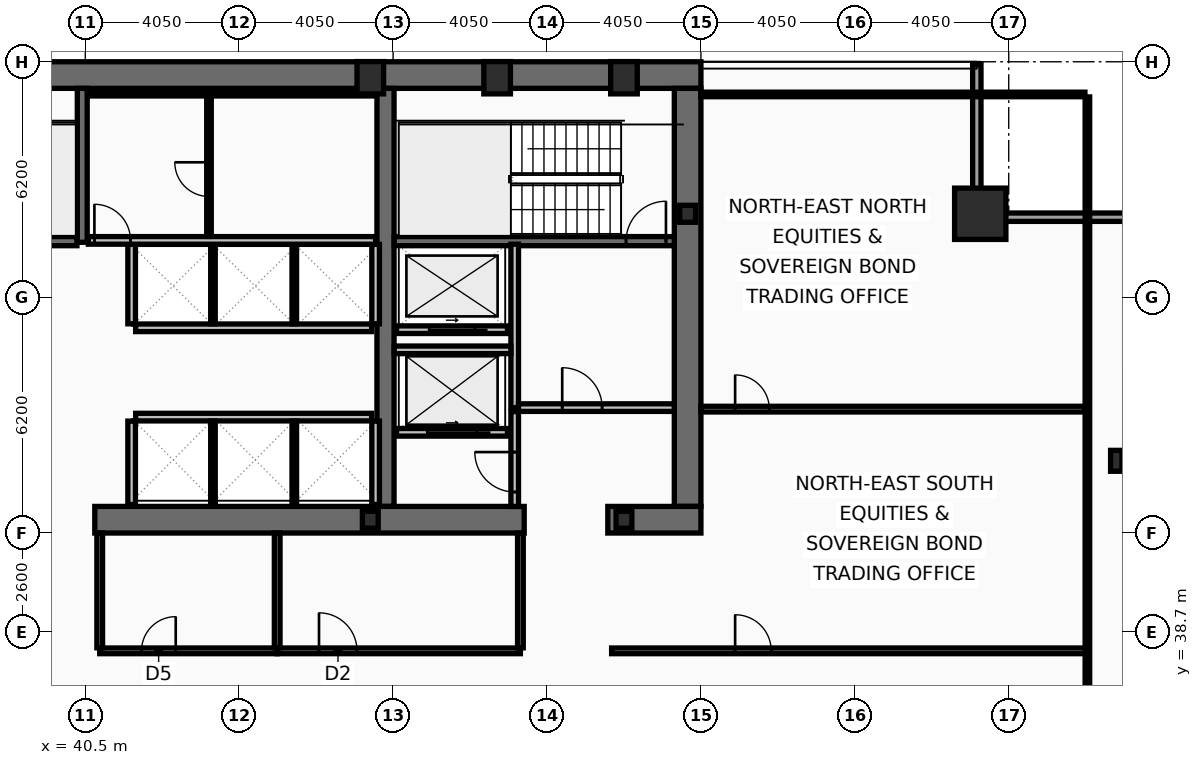
"""IFC4 building model, lengths in metres.
Left out: names, types, materials, properties, quantities, classifications, styles, units other than length and angle.
Written with IfcOpenShell. Run it as: python <this file> out.ifc"""

import sys

from ifc_helpers import new_model, si_unit, direction, frame, frame_2d, origin, origin_2d, place, context, subcontext, project, spatial, rectangle, hollow_rectangle, i_section, extrude, element, fill, save


model = new_model("IFC4")
c1 = context("Model", 3, precision=1e-05, world=origin(), true_north=direction((0.0, 1.0)))
c2 = subcontext(c1, "Body", "Model", "MODEL_VIEW")
j1 = project(units=[si_unit("LENGTHUNIT", "METRE"), si_unit("PLANEANGLEUNIT", "RADIAN")], contexts=[c1])
p1 = place(None, origin())
s1 = spatial("IfcSite", under=j1, at=p1, CompositionType="ELEMENT")
p2 = place(p1, origin())
s2 = spatial("IfcBuilding", under=s1, at=p2, CompositionType="ELEMENT")
p3 = place(p2, frame((0.0, 0.0, 154.2)))
s3 = spatial("IfcBuildingStorey", under=s2, at=p3, CompositionType="ELEMENT", Elevation=154.2)
p4 = place(p3, frame((16.2, 53.35, 0.0), z_axis=(0.0, 0.0, 1.0), x_axis=(1.0, 0.0, 0.0)))
e1 = element("IfcWall", 1, at=p4, inside=s3, PredefinedType="SHEAR", context=c2, shape_type="SweptSolid", body=[
    extrude(rectangle(XDim=40.5, YDim=0.7, at=frame_2d((20.25, 0.0))), origin(), (0.0, 0.0, 1.0), 3.44),
])
p5 = place(p3, frame((56.35, 53.0, 0.0), z_axis=(0.0, 0.0, 1.0), x_axis=(0.0, -1.0, 0.0)))
e2 = element("IfcWall", 2, at=p5, inside=s3, PredefinedType="SHEAR", context=c2, shape_type="SweptSolid", body=[
    extrude(rectangle(XDim=11.0, YDim=0.7, at=frame_2d((5.5, 0.0))), origin(), (0.0, 0.0, 1.0), 3.44),
])
p6 = place(p3, frame((48.4, 42.0, 0.0), z_axis=(0.0, 0.0, 1.0), x_axis=(0.0, 1.0, 0.0)))
e3 = element("IfcWall", 3, at=p6, inside=s3, PredefinedType="SHEAR", context=c2, shape_type="SweptSolid", body=[
    extrude(rectangle(XDim=11.0, YDim=0.45, at=frame_2d((5.5, 0.0))), origin(), (0.0, 0.0, 1.0), 3.44),
])
p7 = place(p3, frame((52.05, 41.65, 0.0), z_axis=(0.0, 0.0, 1.0), x_axis=(-1.0, 0.0, 0.0)))
e4 = element("IfcWall", 4, at=p7, inside=s3, PredefinedType="SHEAR", context=c2, shape_type="SweptSolid", body=[
    extrude(rectangle(XDim=11.3, YDim=0.7, at=frame_2d((5.65, 0.0))), origin(), (0.0, 0.0, 1.0), 3.44),
])
p8 = place(p3, frame((56.7, 41.65, 0.0), z_axis=(0.0, 0.0, 1.0), x_axis=(-1.0, 0.0, 0.0)))
e5 = element("IfcWall", 5, at=p8, inside=s3, PredefinedType="SHEAR", context=c2, shape_type="SweptSolid", body=[
    extrude(rectangle(XDim=2.45, YDim=0.7, at=frame_2d((1.225, 0.0))), origin(), (0.0, 0.0, 1.0), 3.44),
])
p9 = place(p3, frame((40.42, 48.95, 0.0), z_axis=(0.0, 0.0, 1.0), x_axis=(0.0, 1.0, 0.0)))
e6 = element("IfcWall", 6, at=p9, inside=s3, PredefinedType="SHEAR", context=c2, shape_type="SweptSolid", body=[
    extrude(rectangle(XDim=4.05, YDim=0.26, at=frame_2d((2.025, 0.0))), origin(), (0.0, 0.0, 1.0), 3.44),
])
p10 = place(p3, frame((48.63, 48.98, 0.0), z_axis=(0.0, 0.0, 1.0), x_axis=(1.0, 0.0, 0.0)))
e7 = element("IfcWall", 7, at=p10, inside=s3, PredefinedType="SHEAR", context=c2, shape_type="SweptSolid", body=[
    extrude(rectangle(XDim=7.37, YDim=0.24, at=frame_2d((3.685, 0.0))), origin(), (0.0, 0.0, 1.0), 3.44),
])
p11 = place(p10, frame((6.1, 0.0, 0.0)))
e8 = element("IfcOpeningElement", 8, at=p11, cuts=e7, PredefinedType="OPENING", context=c2, shape_type="SweptSolid", body=[
    extrude(rectangle(XDim=1.05, YDim=2.15, at=frame_2d((0.525, 1.075))), frame((0.0, 0.13, 0.0), z_axis=(0.0, -1.0, 0.0), x_axis=(1.0, 0.0, 0.0)), (0.0, 0.0, 1.0), 0.26),
])
p12 = place(p3, frame((32.72, 48.98, 0.0), z_axis=(0.0, 0.0, 1.0), x_axis=(1.0, 0.0, 0.0)))
e9 = element("IfcWall", 9, at=p12, inside=s3, PredefinedType="SHEAR", context=c2, shape_type="SweptSolid", body=[
    extrude(rectangle(XDim=7.56, YDim=0.24, at=frame_2d((3.78, 0.0))), origin(), (0.0, 0.0, 1.0), 3.44),
])
p13 = place(p12, frame((0.22, 0.0, 0.0)))
e10 = element("IfcOpeningElement", 10, at=p13, cuts=e9, PredefinedType="OPENING", context=c2, shape_type="SweptSolid", body=[
    extrude(rectangle(XDim=1.05, YDim=2.15, at=frame_2d((0.525, 1.075))), frame((0.0, 0.13, 0.0), z_axis=(0.0, -1.0, 0.0), x_axis=(1.0, 0.0, 0.0)), (0.0, 0.0, 1.0), 0.26),
])
p14 = place(p3, frame((64.05, 49.7, 0.0), z_axis=(0.0, 0.0, 1.0), x_axis=(1.0, 0.0, 0.0)))
e11 = element("IfcColumn", 11, at=p14, inside=s3, PredefinedType="COLUMN", context=c2, shape_type="SweptSolid", body=[
    extrude(hollow_rectangle(XDim=1.35, YDim=1.35, WallThickness=0.065, at=origin_2d()), origin(), (0.0, 0.0, 1.0), 3.6),
])
for number, where, z_axis, x_axis in (
    (12, (48.0, 53.28, 0.0), (0.0, 0.0, 1.0), (1.0, 0.0, 0.0)),
    (13, (51.337, 53.28, 0.0), (0.0, 0.0, 1.0), (1.0, 0.0, 0.0)),
    (14, (54.675, 53.28, 0.0), (0.0, 0.0, 1.0), (1.0, 0.0, 0.0)),
):
    element("IfcColumn", number, at=place(p3, frame(where, z_axis=z_axis, x_axis=x_axis)), inside=s3, PredefinedType="COLUMN", context=c2, shape_type="SweptSolid", body=[
        extrude(hollow_rectangle(XDim=0.7, YDim=0.85, WallThickness=0.05, at=origin_2d()), origin(), (0.0, 0.0, 1.0), 3.6),
    ])
p15 = place(p3, frame((67.63, 43.2, 0.0), z_axis=(0.0, 0.0, 1.0), x_axis=(1.0, 0.0, 0.0)))
e15 = element("IfcColumn", 15, at=p15, inside=s3, PredefinedType="COLUMN", context=c2, shape_type="SweptSolid", body=[
    extrude(i_section(OverallWidth=0.3, OverallDepth=0.55, WebThickness=0.015, FlangeThickness=0.029, at=origin_2d()), origin(), (0.0, 0.0, 1.0), 3.6),
])
for number, where, z_axis, x_axis in (
    (16, (56.35, 49.7, 0.0), (0.0, 0.0, 1.0), (1.0, 0.0, 0.0)),
    (17, (48.0, 41.65, 0.0), (0.0, 0.0, 1.0), (1.0, 0.0, 0.0)),
    (18, (54.675, 41.65, 0.0), (0.0, 0.0, 1.0), (1.0, 0.0, 0.0)),
):
    element("IfcColumn", number, at=place(p3, frame(where, z_axis=z_axis, x_axis=x_axis)), inside=s3, PredefinedType="COLUMN", context=c2, shape_type="SweptSolid", body=[
        extrude(i_section(OverallWidth=0.416, OverallDepth=0.446, WebThickness=0.039, FlangeThickness=0.063, at=origin_2d()), origin(), (0.0, 0.0, 1.0), 3.6),
    ])
p16 = place(p3, frame((63.96, 53.63, 0.0), z_axis=(0.0, 0.0, 1.0), x_axis=(0.0, -1.0, 0.0)))
e19 = element("IfcWall", 19, at=p16, inside=s3, PredefinedType="SOLIDWALL", context=c2, shape_type="SweptSolid", body=[
    extrude(rectangle(XDim=3.91, YDim=0.22, at=frame_2d((1.955, 0.0))), origin(), (0.0, 0.0, 1.0), 2.83),
])
p17 = place(p3, frame((63.85, 49.61, 0.0), z_axis=(0.0, 0.0, 1.0), x_axis=(1.0, 0.0, 0.0)))
e20 = element("IfcWall", 20, at=p17, inside=s3, PredefinedType="SOLIDWALL", context=c2, shape_type="SweptSolid", body=[
    extrude(rectangle(XDim=4.22, YDim=0.22, at=frame_2d((2.11, 0.0))), origin(), (0.0, 0.0, 1.0), 2.83),
])
p18 = place(p3, frame((51.61, 43.95, 0.0), z_axis=(0.0, 0.0, 1.0), x_axis=(-1.0, 0.0, 0.0)))
e21 = element("IfcWall", 21, at=p18, inside=s3, PredefinedType="PARTITIONING", context=c2, shape_type="SweptSolid", body=[
    extrude(rectangle(XDim=2.92, YDim=0.2, at=frame_2d((1.46, 0.0))), origin(), (0.0, 0.0, 1.0), 3.44),
])
p19 = place(p18, frame((0.81, 0.0, 0.0)))
e22 = element("IfcOpeningElement", 22, at=p19, cuts=e21, PredefinedType="OPENING", context=c2, shape_type="SweptSolid", body=[
    extrude(rectangle(XDim=1.3, YDim=2.18, at=frame_2d((0.65, 1.09))), frame((0.0, 0.11, 0.0), z_axis=(0.0, -1.0, 0.0), x_axis=(1.0, 0.0, 0.0)), (0.0, 0.0, 1.0), 0.22),
])
p20 = place(p3, frame((51.61, 46.65, 0.0), z_axis=(0.0, 0.0, 1.0), x_axis=(-1.0, 0.0, 0.0)))
e23 = element("IfcWall", 23, at=p20, inside=s3, PredefinedType="PARTITIONING", context=c2, shape_type="SweptSolid", body=[
    extrude(rectangle(XDim=2.92, YDim=0.2, at=frame_2d((1.46, 0.0))), origin(), (0.0, 0.0, 1.0), 3.44),
])
p21 = place(p20, frame((0.86, 0.0, 0.0)))
e24 = element("IfcOpeningElement", 24, at=p21, cuts=e23, PredefinedType="OPENING", context=c2, shape_type="SweptSolid", body=[
    extrude(rectangle(XDim=1.2, YDim=2.18, at=frame_2d((0.6, 1.09))), frame((0.0, 0.11, 0.0), z_axis=(0.0, -1.0, 0.0), x_axis=(1.0, 0.0, 0.0)), (0.0, 0.0, 1.0), 0.22),
])
p22 = place(p3, frame((51.8, 44.6, 0.0), z_axis=(0.0, 0.0, 1.0), x_axis=(0.0, 1.0, 0.0)))
e25 = element("IfcWall", 25, at=p22, inside=s3, PredefinedType="PARTITIONING", context=c2, shape_type="SweptSolid", body=[
    extrude(rectangle(XDim=4.3, YDim=0.2, at=frame_2d((2.15, 0.0))), origin(), (0.0, 0.0, 1.0), 3.44),
])
p23 = place(p3, frame((51.9, 44.6, 0.0), z_axis=(0.0, 0.0, 1.0), x_axis=(1.0, 0.0, 0.0)))
e26 = element("IfcWall", 26, at=p23, inside=s3, PredefinedType="PARTITIONING", context=c2, shape_type="SweptSolid", body=[
    extrude(rectangle(XDim=4.1, YDim=0.2, at=frame_2d((2.05, 0.0))), origin(), (0.0, 0.0, 1.0), 3.44),
])
p24 = place(p23, frame((1.15, 0.0, 0.0)))
e27 = element("IfcOpeningElement", 27, at=p24, cuts=e26, PredefinedType="OPENING", context=c2, shape_type="SweptSolid", body=[
    extrude(rectangle(XDim=1.05, YDim=2.15, at=frame_2d((0.525, 1.075))), frame((0.0, 0.11, 0.0), z_axis=(0.0, -1.0, 0.0), x_axis=(1.0, 0.0, 0.0)), (0.0, 0.0, 1.0), 0.22),
])
p25 = place(p3, frame((48.63, 46.12, 0.0), z_axis=(0.0, 0.0, 1.0), x_axis=(1.0, 0.0, 0.0)))
e28 = element("IfcWall", 28, at=p25, inside=s3, PredefinedType="PARTITIONING", context=c2, shape_type="SweptSolid", body=[
    extrude(rectangle(XDim=3.07, YDim=0.2, at=frame_2d((1.535, 0.0))), origin(), (0.0, 0.0, 1.0), 3.44),
])
p26 = place(p3, frame((51.8, 42.0, 0.0), z_axis=(0.0, 0.0, 1.0), x_axis=(0.0, 1.0, 0.0)))
e29 = element("IfcWall", 29, at=p26, inside=s3, PredefinedType="PARTITIONING", context=c2, shape_type="SweptSolid", body=[
    extrude(rectangle(XDim=2.495, YDim=0.2, at=frame_2d((1.248, 0.0))), origin(), (0.0, 0.0, 1.0), 3.44),
])
p27 = place(p26, frame((0.38, 0.0, 0.0)))
e30 = element("IfcOpeningElement", 30, at=p27, cuts=e29, PredefinedType="OPENING", context=c2, shape_type="SweptSolid", body=[
    extrude(rectangle(XDim=1.05, YDim=2.15, at=frame_2d((0.525, 1.075))), frame((0.0, 0.11, 0.0), z_axis=(0.0, -1.0, 0.0), x_axis=(1.0, 0.0, 0.0)), (0.0, 0.0, 1.0), 0.22),
])
p28 = place(p3, frame((41.825, 46.7, 0.0), z_axis=(0.0, 0.0, 1.0), x_axis=(1.0, 0.0, 0.0)))
e31 = element("IfcWall", 31, at=p28, inside=s3, PredefinedType="PARTITIONING", context=c2, shape_type="SweptSolid", body=[
    extrude(rectangle(XDim=6.21, YDim=0.2, at=frame_2d((3.105, 0.0))), origin(), (0.0, 0.0, 1.0), 3.44),
])
for number, where, z_axis, x_axis in (
    (32, (41.72, 46.805, 0.0), (0.0, 0.0, 1.0), (0.0, 1.0, 0.0)),
    (33, (48.14, 46.805, 0.0), (0.0, 0.0, 1.0), (0.0, 1.0, 0.0)),
):
    element("IfcWall", number, at=place(p3, frame(where, z_axis=z_axis, x_axis=x_axis)), inside=s3, PredefinedType="PARTITIONING", context=c2, shape_type="SweptSolid", body=[
        extrude(rectangle(XDim=2.09, YDim=0.2, at=frame_2d((1.045, 0.0))), origin(), (0.0, 0.0, 1.0), 3.44),
    ])
for number, where, z_axis, x_axis in (
    (34, (43.86, 46.805, 0.0), (0.0, 0.0, 1.0), (0.0, 1.0, 0.0)),
    (35, (46.0, 46.805, 0.0), (0.0, 0.0, 1.0), (0.0, 1.0, 0.0)),
):
    element("IfcWall", number, at=place(p3, frame(where, z_axis=z_axis, x_axis=x_axis)), inside=s3, PredefinedType="PARTITIONING", context=c2, shape_type="SweptSolid", body=[
        extrude(rectangle(XDim=2.09, YDim=0.12, at=frame_2d((1.045, 0.0))), origin(), (0.0, 0.0, 1.0), 3.44),
    ])
p29 = place(p3, frame((41.825, 44.35, 0.0), z_axis=(0.0, 0.0, 1.0), x_axis=(1.0, 0.0, 0.0)))
e36 = element("IfcWall", 36, at=p29, inside=s3, PredefinedType="PARTITIONING", context=c2, shape_type="SweptSolid", body=[
    extrude(rectangle(XDim=6.21, YDim=0.2, at=frame_2d((3.105, 0.0))), origin(), (0.0, 0.0, 1.0), 3.44),
])
for number, where, z_axis, x_axis in (
    (37, (41.72, 42.05, 0.0), (0.0, 0.0, 1.0), (0.0, 1.0, 0.0)),
    (38, (48.14, 42.05, 0.0), (0.0, 0.0, 1.0), (0.0, 1.0, 0.0)),
):
    element("IfcWall", number, at=place(p3, frame(where, z_axis=z_axis, x_axis=x_axis)), inside=s3, PredefinedType="PARTITIONING", context=c2, shape_type="SweptSolid", body=[
        extrude(rectangle(XDim=2.195, YDim=0.2, at=frame_2d((1.098, 0.0))), origin(), (0.0, 0.0, 1.0), 3.44),
    ])
for number, where, z_axis, x_axis in (
    (39, (43.86, 42.05, 0.0), (0.0, 0.0, 1.0), (0.0, 1.0, 0.0)),
    (40, (46.0, 42.05, 0.0), (0.0, 0.0, 1.0), (0.0, 1.0, 0.0)),
):
    element("IfcWall", number, at=place(p3, frame(where, z_axis=z_axis, x_axis=x_axis)), inside=s3, PredefinedType="PARTITIONING", context=c2, shape_type="SweptSolid", body=[
        extrude(rectangle(XDim=2.195, YDim=0.12, at=frame_2d((1.098, 0.0))), origin(), (0.0, 0.0, 1.0), 3.44),
    ])
p30 = place(p3, frame((40.58, 52.86, 0.0), z_axis=(0.0, 0.0, 1.0), x_axis=(1.0, 0.0, 0.0)))
e41 = element("IfcWall", 41, at=p30, inside=s3, PredefinedType="PARTITIONING", context=c2, shape_type="SweptSolid", body=[
    extrude(rectangle(XDim=7.56, YDim=0.12, at=frame_2d((3.78, 0.0))), origin(), (0.0, 0.0, 1.0), 3.44),
])
p31 = place(p3, frame((40.58, 49.0, 0.0), z_axis=(0.0, 0.0, 1.0), x_axis=(1.0, 0.0, 0.0)))
e42 = element("IfcWall", 42, at=p31, inside=s3, PredefinedType="PARTITIONING", context=c2, shape_type="SweptSolid", body=[
    extrude(rectangle(XDim=7.56, YDim=0.2, at=frame_2d((3.78, 0.0))), origin(), (0.0, 0.0, 1.0), 3.44),
])
p32 = place(p31, frame((0.16, 0.0, 0.0)))
e43 = element("IfcOpeningElement", 43, at=p32, cuts=e42, PredefinedType="OPENING", context=c2, shape_type="SweptSolid", body=[
    extrude(rectangle(XDim=0.95, YDim=2.1, at=frame_2d((0.475, 1.05))), frame((0.0, 0.11, 0.0), z_axis=(0.0, -1.0, 0.0), x_axis=(1.0, 0.0, 0.0)), (0.0, 0.0, 1.0), 0.22),
])
p33 = place(p3, frame((43.755, 49.105, 0.0), z_axis=(0.0, 0.0, 1.0), x_axis=(0.0, 1.0, 0.0)))
e44 = element("IfcWall", 44, at=p33, inside=s3, PredefinedType="PARTITIONING", context=c2, shape_type="SweptSolid", body=[
    extrude(rectangle(XDim=3.69, YDim=0.12, at=frame_2d((1.845, 0.0))), origin(), (0.0, 0.0, 1.0), 3.44),
])
p34 = place(p33, frame((1.05, 0.0, 0.0)))
e45 = element("IfcOpeningElement", 45, at=p34, cuts=e44, PredefinedType="OPENING", context=c2, shape_type="SweptSolid", body=[
    extrude(rectangle(XDim=0.9, YDim=2.05, at=frame_2d((0.45, 1.025))), frame((0.0, 0.07, 0.0), z_axis=(0.0, -1.0, 0.0), x_axis=(1.0, 0.0, 0.0)), (0.0, 0.0, 1.0), 0.14),
])
p35 = place(p3, frame((40.88, 38.2, 0.0), z_axis=(0.0, 0.0, 1.0), x_axis=(1.0, 0.0, 0.0)))
e46 = element("IfcWall", 46, at=p35, inside=s3, PredefinedType="PARTITIONING", context=c2, shape_type="SweptSolid", body=[
    extrude(rectangle(XDim=4.67, YDim=0.15, at=frame_2d((2.335, 0.0))), origin(), (0.0, 0.0, 1.0), 2.73),
])
p36 = place(p35, frame((1.1, 0.0, 0.0)))
e47 = element("IfcOpeningElement", 47, at=p36, cuts=e46, PredefinedType="OPENING", context=c2, shape_type="SweptSolid", body=[
    extrude(rectangle(XDim=0.9, YDim=2.05, at=frame_2d((0.45, 1.025))), frame((0.0, 0.085, 0.0), z_axis=(0.0, -1.0, 0.0), x_axis=(1.0, 0.0, 0.0)), (0.0, 0.0, 1.0), 0.17),
])
p37 = place(p3, frame((45.55, 38.2, 0.0), z_axis=(0.0, 0.0, 1.0), x_axis=(1.0, 0.0, 0.0)))
e48 = element("IfcWall", 48, at=p37, inside=s3, PredefinedType="PARTITIONING", context=c2, shape_type="SweptSolid", body=[
    extrude(rectangle(XDim=6.4, YDim=0.15, at=frame_2d((3.2, 0.0))), origin(), (0.0, 0.0, 1.0), 2.73),
])
p38 = place(p37, frame((1.1, 0.0, 0.0)))
e49 = element("IfcOpeningElement", 49, at=p38, cuts=e48, PredefinedType="OPENING", context=c2, shape_type="SweptSolid", body=[
    extrude(rectangle(XDim=1.0, YDim=2.05, at=frame_2d((0.5, 1.025))), frame((0.0, 0.085, 0.0), z_axis=(0.0, -1.0, 0.0), x_axis=(1.0, 0.0, 0.0)), (0.0, 0.0, 1.0), 0.17),
])
for number, where, z_axis, x_axis in (
    (50, (40.88, 38.28, 0.0), (0.0, 0.0, 1.0), (0.0, 1.0, 0.0)),
    (51, (45.55, 38.28, 0.0), (0.0, 0.0, 1.0), (0.0, 1.0, 0.0)),
    (52, (51.95, 38.28, 0.0), (0.0, 0.0, 1.0), (0.0, 1.0, 0.0)),
):
    element("IfcWall", number, at=place(p3, frame(where, z_axis=z_axis, x_axis=x_axis)), inside=s3, PredefinedType="PARTITIONING", context=c2, shape_type="SweptSolid", body=[
        extrude(rectangle(XDim=3.02, YDim=0.15, at=frame_2d((1.51, 0.0))), origin(), (0.0, 0.0, 1.0), 3.44),
    ])
p39 = place(p3, frame((54.35, 38.2, 0.0), z_axis=(0.0, 0.0, 1.0), x_axis=(1.0, 0.0, 0.0)))
e53 = element("IfcWall", 53, at=p39, inside=s3, PredefinedType="PARTITIONING", context=c2, shape_type="SweptSolid", body=[
    extrude(rectangle(XDim=12.52, YDim=0.15, at=frame_2d((6.26, 0.0))), origin(), (0.0, 0.0, 1.0), 2.73),
])
p40 = place(p39, frame((3.25, 0.0, 0.0)))
e54 = element("IfcOpeningElement", 54, at=p40, cuts=e53, PredefinedType="OPENING", context=c2, shape_type="SweptSolid", body=[
    extrude(rectangle(XDim=0.95, YDim=2.05, at=frame_2d((0.475, 1.025))), frame((0.0, 0.085, 0.0), z_axis=(0.0, -1.0, 0.0), x_axis=(1.0, 0.0, 0.0)), (0.0, 0.0, 1.0), 0.17),
])
p41 = place(p3, frame((56.7, 44.56, 0.0), z_axis=(0.0, 0.0, 1.0), x_axis=(1.0, 0.0, 0.0)))
e55 = element("IfcWall", 55, at=p41, inside=s3, PredefinedType="PARTITIONING", context=c2, shape_type="SweptSolid", body=[
    extrude(rectangle(XDim=10.105, YDim=0.15, at=frame_2d((5.052, 0.0))), origin(), (0.0, 0.0, 1.0), 2.83),
])
p42 = place(p41, frame((0.9, 0.0, 0.0)))
e56 = element("IfcOpeningElement", 56, at=p42, cuts=e55, PredefinedType="OPENING", context=c2, shape_type="SweptSolid", body=[
    extrude(rectangle(XDim=0.9, YDim=2.05, at=frame_2d((0.45, 1.025))), frame((0.0, 0.085, 0.0), z_axis=(0.0, -1.0, 0.0), x_axis=(1.0, 0.0, 0.0)), (0.0, 0.0, 1.0), 0.17),
])
p43 = place(p3, frame((66.87, 10.665, 0.0), z_axis=(0.0, 0.0, 1.0), x_axis=(0.0, 1.0, 0.0)))
e57 = element("IfcWall", 57, at=p43, inside=s3, PredefinedType="PARTITIONING", context=c2, shape_type="SweptSolid", body=[
    extrude(rectangle(XDim=42.11, YDim=0.12, at=frame_2d((21.055, 0.0))), origin(), (0.0, 0.0, 1.0), 2.73),
])
p44 = place(p3, frame((56.7, 52.84, 0.0), z_axis=(0.0, 0.0, 1.0), x_axis=(1.0, 0.0, 0.0)))
e58 = element("IfcWall", 58, at=p44, inside=s3, PredefinedType="PARTITIONING", context=c2, shape_type="SweptSolid", body=[
    extrude(rectangle(XDim=10.105, YDim=0.12, at=frame_2d((5.052, 0.0))), origin(), (0.0, 0.0, 1.0), 3.44),
])
p45 = place(p11, origin())
e59 = element("IfcDoor", 59, at=p45, inside=s3, OperationType="SINGLE_SWING_RIGHT", PredefinedType="DOOR", context=c2, shape_type="SweptSolid", body=[
    extrude(rectangle(XDim=1.05, YDim=2.15, at=frame_2d((0.525, 1.075))), frame((0.0, 0.025, 0.0), z_axis=(0.0, -1.0, 0.0), x_axis=(1.0, 0.0, 0.0)), (0.0, 0.0, 1.0), 0.05),
])
fill(e8, e59)
p46 = place(p19, origin())
e60 = element("IfcDoor", 60, at=p46, inside=s3, OperationType="SLIDING_TO_LEFT", PredefinedType="DOOR", context=c2, shape_type="SweptSolid", body=[
    extrude(rectangle(XDim=1.3, YDim=2.18, at=frame_2d((0.65, 1.09))), frame((0.0, 0.025, 0.0), z_axis=(0.0, -1.0, 0.0), x_axis=(1.0, 0.0, 0.0)), (0.0, 0.0, 1.0), 0.05),
])
fill(e22, e60)
p47 = place(p21, origin())
e61 = element("IfcDoor", 61, at=p47, inside=s3, OperationType="SLIDING_TO_LEFT", PredefinedType="DOOR", context=c2, shape_type="SweptSolid", body=[
    extrude(rectangle(XDim=1.2, YDim=2.18, at=frame_2d((0.6, 1.09))), frame((0.0, 0.025, 0.0), z_axis=(0.0, -1.0, 0.0), x_axis=(1.0, 0.0, 0.0)), (0.0, 0.0, 1.0), 0.05),
])
fill(e24, e61)
p48 = place(p24, origin())
e62 = element("IfcDoor", 62, at=p48, inside=s3, OperationType="SINGLE_SWING_LEFT", PredefinedType="DOOR", context=c2, shape_type="SweptSolid", body=[
    extrude(rectangle(XDim=1.05, YDim=2.15, at=frame_2d((0.525, 1.075))), frame((0.0, 0.025, 0.0), z_axis=(0.0, -1.0, 0.0), x_axis=(1.0, 0.0, 0.0)), (0.0, 0.0, 1.0), 0.05),
])
fill(e27, e62)
p49 = place(p27, origin())
e63 = element("IfcDoor", 63, at=p49, inside=s3, OperationType="SINGLE_SWING_RIGHT", PredefinedType="DOOR", context=c2, shape_type="SweptSolid", body=[
    extrude(rectangle(XDim=1.05, YDim=2.15, at=frame_2d((0.525, 1.075))), frame((0.0, 0.025, 0.0), z_axis=(0.0, -1.0, 0.0), x_axis=(1.0, 0.0, 0.0)), (0.0, 0.0, 1.0), 0.05),
])
fill(e30, e63)
p50 = place(p32, origin())
e64 = element("IfcDoor", 64, at=p50, inside=s3, OperationType="SINGLE_SWING_LEFT", PredefinedType="DOOR", context=c2, shape_type="SweptSolid", body=[
    extrude(rectangle(XDim=0.95, YDim=2.1, at=frame_2d((0.475, 1.05))), frame((0.0, 0.025, 0.0), z_axis=(0.0, -1.0, 0.0), x_axis=(1.0, 0.0, 0.0)), (0.0, 0.0, 1.0), 0.05),
])
fill(e43, e64)
p51 = place(p34, origin())
e65 = element("IfcDoor", 65, at=p51, inside=s3, OperationType="SINGLE_SWING_RIGHT", PredefinedType="DOOR", context=c2, shape_type="SweptSolid", body=[
    extrude(rectangle(XDim=0.9, YDim=2.05, at=frame_2d((0.45, 1.025))), frame((0.0, 0.025, 0.0), z_axis=(0.0, -1.0, 0.0), x_axis=(1.0, 0.0, 0.0)), (0.0, 0.0, 1.0), 0.05),
])
fill(e45, e65)
p52 = place(p36, origin())
e66 = element("IfcDoor", 66, at=p52, inside=s3, OperationType="SINGLE_SWING_RIGHT", PredefinedType="DOOR", context=c2, shape_type="SweptSolid", body=[
    extrude(rectangle(XDim=0.9, YDim=2.05, at=frame_2d((0.45, 1.025))), frame((0.0, 0.025, 0.0), z_axis=(0.0, -1.0, 0.0), x_axis=(1.0, 0.0, 0.0)), (0.0, 0.0, 1.0), 0.05),
])
fill(e47, e66)
p53 = place(p38, origin())
e67 = element("IfcDoor", 67, at=p53, inside=s3, OperationType="SINGLE_SWING_LEFT", PredefinedType="DOOR", context=c2, shape_type="SweptSolid", body=[
    extrude(rectangle(XDim=1.0, YDim=2.05, at=frame_2d((0.5, 1.025))), frame((0.0, 0.025, 0.0), z_axis=(0.0, -1.0, 0.0), x_axis=(1.0, 0.0, 0.0)), (0.0, 0.0, 1.0), 0.05),
])
fill(e49, e67)
p54 = place(p40, origin())
e68 = element("IfcDoor", 68, at=p54, inside=s3, OperationType="SINGLE_SWING_LEFT", PredefinedType="DOOR", context=c2, shape_type="SweptSolid", body=[
    extrude(rectangle(XDim=0.95, YDim=2.05, at=frame_2d((0.475, 1.025))), frame((0.0, 0.025, 0.0), z_axis=(0.0, -1.0, 0.0), x_axis=(1.0, 0.0, 0.0)), (0.0, 0.0, 1.0), 0.05),
])
fill(e54, e68)
p55 = place(p42, origin())
e69 = element("IfcDoor", 69, at=p55, inside=s3, OperationType="SINGLE_SWING_LEFT", PredefinedType="DOOR", context=c2, shape_type="SweptSolid", body=[
    extrude(rectangle(XDim=0.9, YDim=2.05, at=frame_2d((0.45, 1.025))), frame((0.0, 0.025, 0.0), z_axis=(0.0, -1.0, 0.0), x_axis=(1.0, 0.0, 0.0)), (0.0, 0.0, 1.0), 0.05),
])
fill(e56, e69)
save(model, sys.argv[1])
